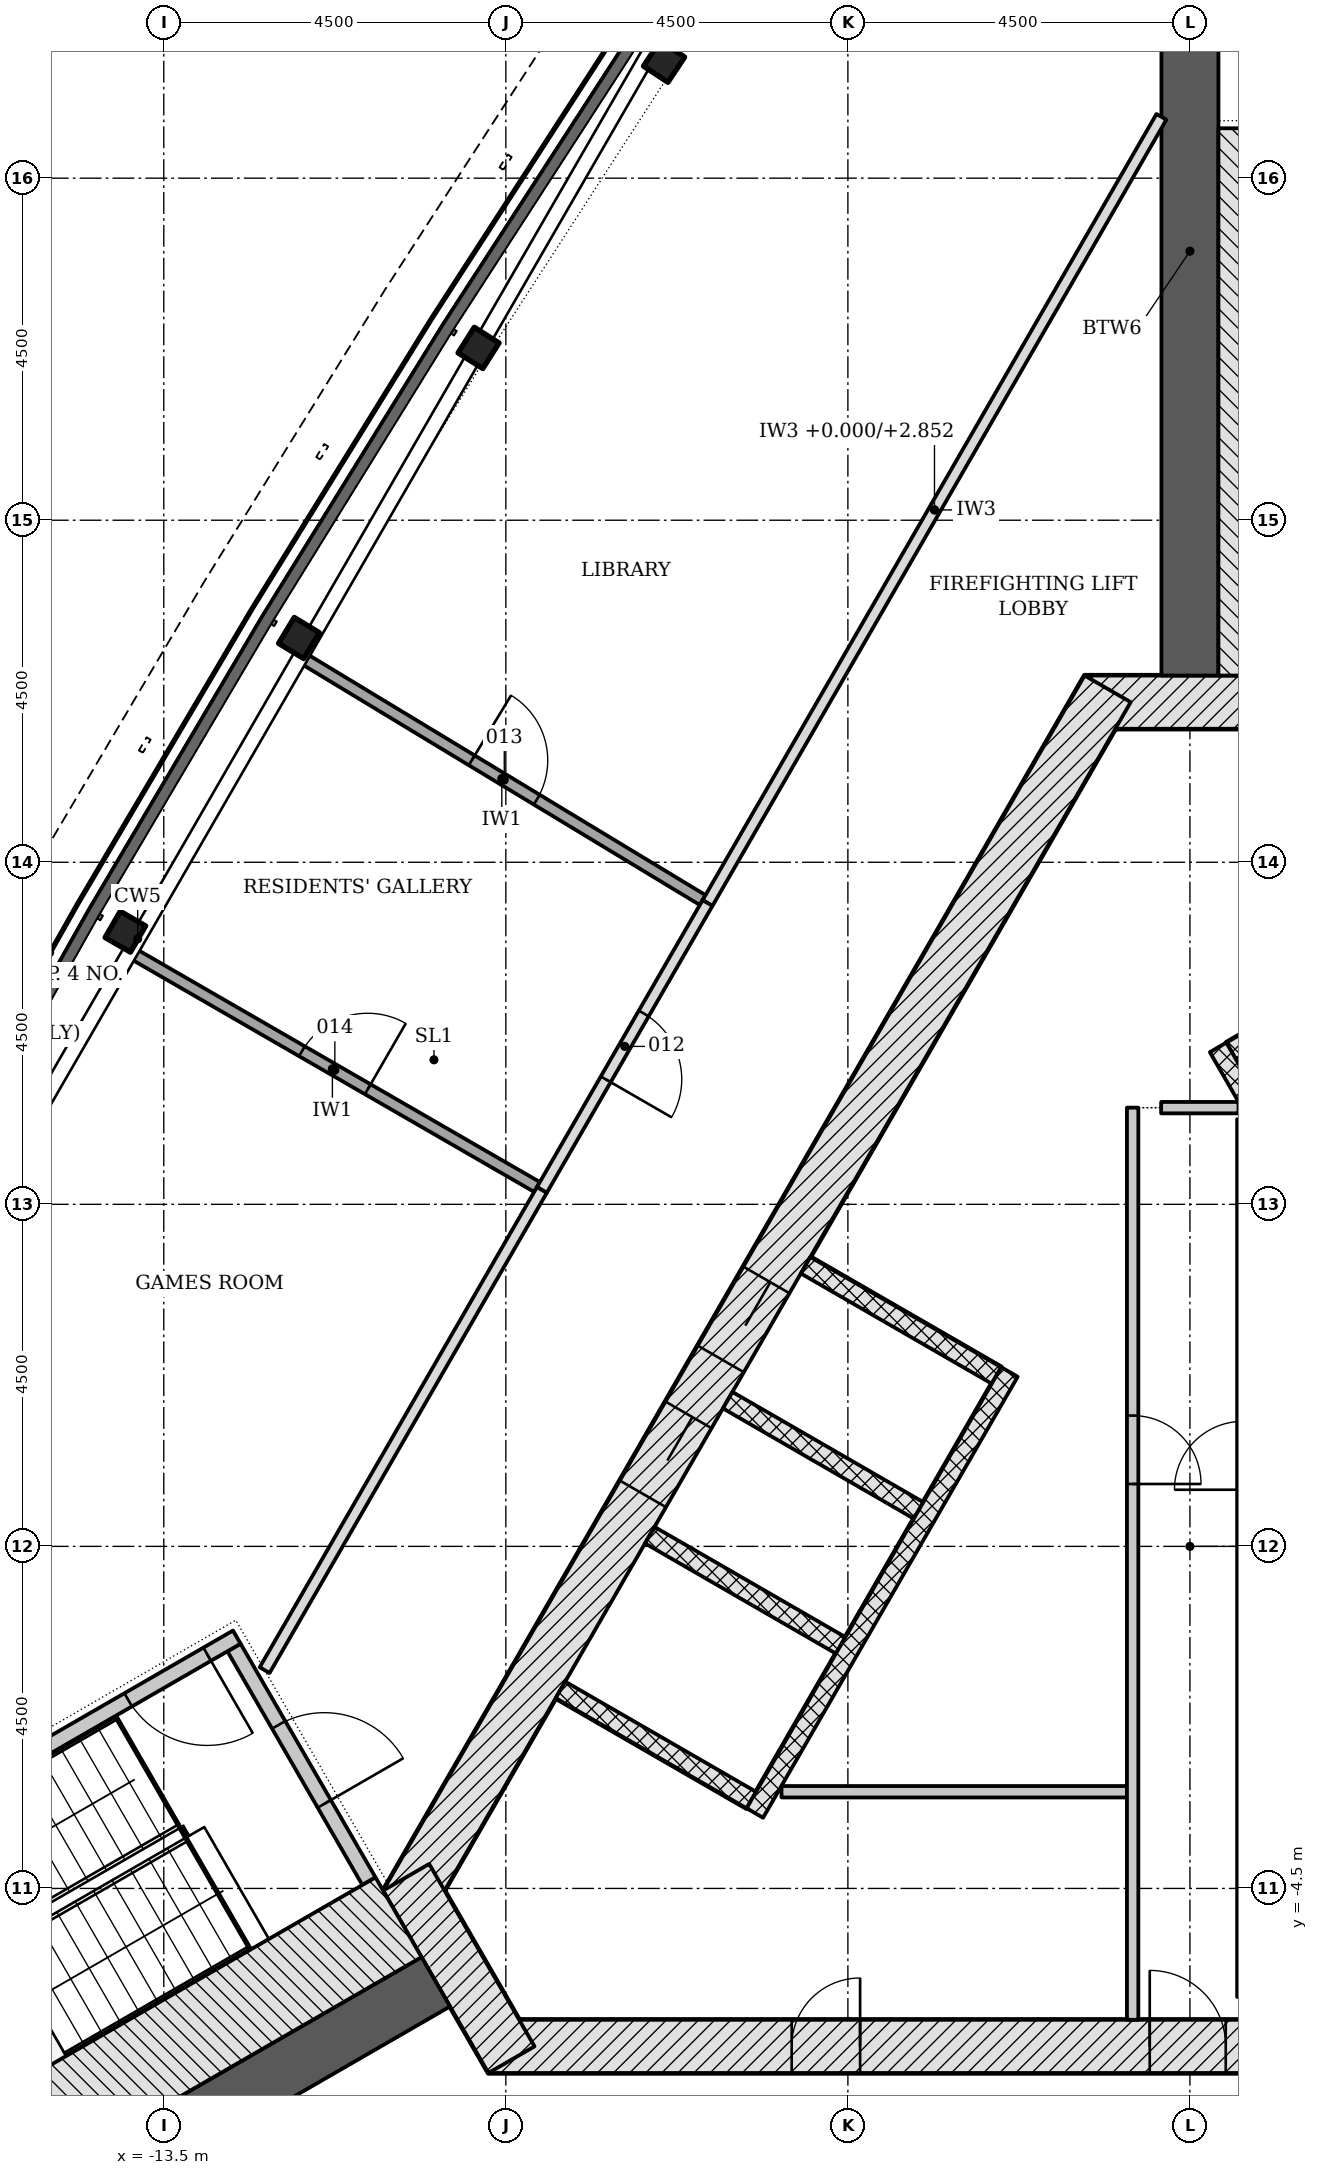
"""IFC4 building model, lengths in metres.
Left out: names, types, materials, properties, quantities, classifications, styles, units other than length and angle.
Written with IfcOpenShell. Run it as: python <this file> out.ifc"""

import sys

from ifc_helpers import new_model, si_unit, direction, frame, frame_2d, origin, origin_2d, place, context, subcontext, project, spatial, rectangle, i_section, extrude, element, fill, save


model = new_model("IFC4")
c1 = context("Model", 3, precision=1e-05, world=origin(), true_north=direction((0.0, 1.0)))
c2 = subcontext(c1, "Body", "Model", "MODEL_VIEW")
j1 = project(units=[si_unit("LENGTHUNIT", "METRE"), si_unit("PLANEANGLEUNIT", "RADIAN")], contexts=[c1])
p1 = place(None, origin())
s1 = spatial("IfcSite", under=j1, at=p1, CompositionType="ELEMENT")
p2 = place(p1, origin())
s2 = spatial("IfcBuilding", under=s1, at=p2, CompositionType="ELEMENT")
p3 = place(p2, frame((0.0, 0.0, 140.1)))
s3 = spatial("IfcBuildingStorey", under=s2, at=p3, CompositionType="ELEMENT", Elevation=140.1)
p4 = place(p3, frame((-9.229, -6.578, -0.2), z_axis=(0.0, 0.0, 1.0), x_axis=(1.0, 0.0, 0.0)))
e1 = element("IfcWall", 1, at=p4, inside=s3, PredefinedType="SHEAR", context=c2, shape_type="SweptSolid", body=[
    extrude(rectangle(XDim=18.458, YDim=0.7, at=frame_2d((9.229, 0.0))), origin(), (0.0, 0.0, 1.0), 3.6),
])
p5 = place(p4, frame((8.7, 0.0, 0.2)))
e2 = element("IfcOpeningElement", 2, at=p5, cuts=e1, PredefinedType="OPENING", context=c2, shape_type="SweptSolid", body=[
    extrude(rectangle(XDim=1.0, YDim=2.1, at=frame_2d((0.5, 1.05))), frame((0.0, 0.36, 0.0), z_axis=(0.0, -1.0, 0.0), x_axis=(1.0, 0.0, 0.0)), (0.0, 0.0, 1.0), 0.72),
])
p6 = place(p4, frame((3.99, 0.0, 0.2)))
e3 = element("IfcOpeningElement", 3, at=p6, cuts=e1, PredefinedType="OPENING", context=c2, shape_type="SweptSolid", body=[
    extrude(rectangle(XDim=0.9, YDim=2.1, at=frame_2d((0.45, 1.05))), frame((0.0, 0.36, 0.0), z_axis=(0.0, -1.0, 0.0), x_axis=(1.0, 0.0, 0.0)), (0.0, 0.0, 1.0), 0.72),
])
p7 = place(p4, frame((13.489, 0.0, 0.2)))
e4 = element("IfcOpeningElement", 4, at=p7, cuts=e1, PredefinedType="OPENING", context=c2, shape_type="SweptSolid", body=[
    extrude(rectangle(XDim=1.0, YDim=2.1, at=frame_2d((0.5, 1.05))), frame((0.0, 0.36, 0.0), z_axis=(0.0, -1.0, 0.0), x_axis=(1.0, 0.0, 0.0)), (0.0, 0.0, 1.0), 0.72),
])
p8 = place(p3, frame((1.386, 11.106, -0.2), z_axis=(0.0, 0.0, 1.0), x_axis=(-1.0, 0.0, 0.0)))
e5 = element("IfcWall", 5, at=p8, inside=s3, PredefinedType="SHEAR", context=c2, shape_type="SweptSolid", body=[
    extrude(rectangle(XDim=2.771, YDim=0.7, at=frame_2d((1.386, 0.0))), origin(), (0.0, 0.0, 1.0), 3.6),
])
p9 = place(p3, frame((-1.083, 11.281, -0.2), z_axis=(0.0, 0.0, 1.0), x_axis=(-0.500001446645, -0.866024568562, 0.0)))
e6 = element("IfcWall", 6, at=p9, inside=s3, PredefinedType="SHEAR", context=c2, shape_type="SweptSolid", body=[
    extrude(rectangle(XDim=18.458, YDim=0.7, at=frame_2d((9.229, 0.0))), origin(), (0.0, 0.0, 1.0), 3.6),
])
p10 = place(p9, frame((8.979, 0.0, 0.2)))
e7 = element("IfcOpeningElement", 7, at=p10, cuts=e6, PredefinedType="OPENING", context=c2, shape_type="SweptSolid", body=[
    extrude(rectangle(XDim=1.2, YDim=2.1, at=frame_2d((0.6, 1.05))), frame((0.0, 0.36, 0.0), z_axis=(0.0, -1.0, 0.0), x_axis=(1.0, 0.0, 0.0)), (0.0, 0.0, 1.0), 0.72),
])
p11 = place(p9, frame((11.029, 0.0, 0.2)))
e8 = element("IfcOpeningElement", 8, at=p11, cuts=e6, PredefinedType="OPENING", context=c2, shape_type="SweptSolid", body=[
    extrude(rectangle(XDim=1.2, YDim=2.1, at=frame_2d((0.6, 1.05))), frame((0.0, 0.36, 0.0), z_axis=(0.0, -1.0, 0.0), x_axis=(1.0, 0.0, 0.0)), (0.0, 0.0, 1.0), 0.72),
])
p12 = place(p3, frame((-10.311, -4.353, -0.2), z_axis=(0.0, 0.0, 1.0), x_axis=(0.500042739161, -0.866000726912, 0.0)))
e9 = element("IfcWall", 9, at=p12, inside=s3, PredefinedType="SHEAR", context=c2, shape_type="SweptSolid", body=[
    extrude(rectangle(XDim=2.771, YDim=0.7, at=frame_2d((1.386, 0.0))), origin(), (0.0, 0.0, 1.0), 3.6),
])
p13 = place(p3, frame((0.0, 11.456, -0.2), z_axis=(0.0, 0.0, 1.0), x_axis=(0.0, 1.0, 0.0)))
e10 = element("IfcWall", 10, at=p13, inside=s3, PredefinedType="SHEAR", context=c2, shape_type="SweptSolid", body=[
    extrude(rectangle(XDim=11.167, YDim=0.75, at=frame_2d((5.583, 0.0))), origin(), (0.0, 0.0, 1.0), 3.6),
])
p14 = place(p3, frame((-9.922, -5.728, -0.2), z_axis=(0.0, 0.0, 1.0), x_axis=(-0.866023928423, -0.500002555393, 0.0)))
e11 = element("IfcWall", 11, at=p14, inside=s3, PredefinedType="SHEAR", context=c2, shape_type="SweptSolid", body=[
    extrude(rectangle(XDim=11.167, YDim=0.75, at=frame_2d((5.583, 0.0))), origin(), (0.0, 0.0, 1.0), 3.6),
])
for number, where, z_axis, x_axis in (
    (12, (-6.918, 19.534, -0.2), (0.0, 0.0, 1.0), (-0.552, -0.834, 0.0)),
    (13, (-9.359, 15.767, -0.2), (0.0, 0.0, 1.0), (-0.535, -0.845, 0.0)),
    (14, (-11.722, 11.95, -0.2), (0.0, 0.0, 1.0), (-0.518, -0.856, 0.0)),
    (15, (-14.006, 8.086, -0.2), (0.0, 0.0, 1.0), (-0.5, -0.866, 0.0)),
):
    element("IfcColumn", number, at=place(p3, frame(where, z_axis=z_axis, x_axis=x_axis)), inside=s3, PredefinedType="COLUMN", context=c2, shape_type="SweptSolid", body=[
        extrude(i_section(OverallWidth=0.399, OverallDepth=0.386, WebThickness=0.021, FlangeThickness=0.033, FilletRadius=0.015, at=origin_2d()), origin(), (0.0, 0.0, 1.0), 3.6),
    ])
p15 = place(p3, frame((2.706, 7.769, -0.2), z_axis=(0.0, 0.0, 1.0), x_axis=(-0.866022959057, -0.500004234368, 0.0)))
e16 = element("IfcWall", 16, at=p15, inside=s3, PredefinedType="PARTITIONING", context=c2, shape_type="SweptSolid", body=[
    extrude(rectangle(XDim=2.5, YDim=0.25, at=frame_2d((1.25, 0.0))), origin(), (0.0, 0.0, 1.0), 3.6),
])
p16 = place(p3, frame((5.87, -2.961, 0.0), z_axis=(0.0, 0.0, 1.0), x_axis=(-0.50000615651, 0.866021849293, 0.0)))
e17 = element("IfcWall", 17, at=p16, inside=s3, PredefinedType="PARTITIONING", context=c2, shape_type="SweptSolid", body=[
    extrude(rectangle(XDim=11.0, YDim=0.25, at=frame_2d((5.5, 0.0))), origin(), (0.0, 0.0, 1.0), 3.4),
])
for number, where, z_axis, x_axis in (
    (18, (-5.056, 3.699, -0.2), (0.0, 0.0, 1.0), (0.866, -0.5, 0.0)),
    (19, (-6.081, 1.923, -0.2), (0.0, 0.0, 1.0), (0.866, -0.5, 0.0)),
    (20, (-7.106, 0.148, -0.2), (0.0, 0.0, 1.0), (0.866, -0.5, 0.0)),
    (21, (-8.281, -1.887, -0.2), (0.0, 0.0, 1.0), (0.866, -0.5, 0.0)),
):
    element("IfcWall", number, at=place(p3, frame(where, z_axis=z_axis, x_axis=x_axis)), inside=s3, PredefinedType="PARTITIONING", context=c2, shape_type="SweptSolid", body=[
        extrude(rectangle(XDim=2.9, YDim=0.25, at=frame_2d((1.45, 0.0))), origin(), (0.0, 0.0, 1.0), 3.6),
    ])
p17 = place(p3, frame((-2.374, 2.294, 0.0), z_axis=(0.0, 0.0, 1.0), x_axis=(-0.500003174267, -0.866023571113, 0.0)))
e22 = element("IfcWall", 22, at=p17, inside=s3, PredefinedType="PARTITIONING", context=c2, shape_type="SweptSolid", body=[
    extrude(rectangle(XDim=6.7, YDim=0.25, at=frame_2d((3.35, 0.0))), origin(), (0.0, 0.0, 1.0), 3.4),
])
p18 = place(p3, frame((-5.373, -3.228, 0.0), z_axis=(0.0, 0.0, 1.0), x_axis=(1.0, 0.0, 0.0)))
e23 = element("IfcWall", 23, at=p18, inside=s3, PredefinedType="PARTITIONING", context=c2, shape_type="SweptSolid", body=[
    extrude(rectangle(XDim=4.545, YDim=0.15, at=frame_2d((2.272, 0.0))), origin(), (0.0, 0.0, 1.0), 3.4),
])
p19 = place(p3, frame((-0.754, 5.772, 0.0), z_axis=(0.0, 0.0, 1.0), x_axis=(0.0, -1.0, 0.0)))
e24 = element("IfcWall", 24, at=p19, inside=s3, PredefinedType="PARTITIONING", context=c2, shape_type="SweptSolid", body=[
    extrude(rectangle(XDim=12.0, YDim=0.15, at=frame_2d((6.0, 0.0))), origin(), (0.0, 0.0, 1.0), 3.4),
])
p20 = place(p19, frame((4.051, 0.0, 0.0)))
e25 = element("IfcOpeningElement", 25, at=p20, cuts=e24, PredefinedType="OPENING", context=c2, shape_type="SweptSolid", body=[
    extrude(rectangle(XDim=0.9, YDim=2.1, at=frame_2d((0.45, 1.05))), frame((0.0, 0.085, 0.0), z_axis=(0.0, -1.0, 0.0), x_axis=(1.0, 0.0, 0.0)), (0.0, 0.0, 1.0), 0.17),
])
p21 = place(p3, frame((-0.379, 5.772, 0.0), z_axis=(0.0, 0.0, 1.0), x_axis=(1.0, 0.0, 0.0)))
e26 = element("IfcWall", 26, at=p21, inside=s3, PredefinedType="PARTITIONING", context=c2, shape_type="SweptSolid", body=[
    extrude(rectangle(XDim=1.018, YDim=0.15, at=frame_2d((0.509, 0.0))), origin(), (0.0, 0.0, 1.0), 3.4),
])
p22 = place(p3, frame((0.696, -5.928, 0.0), z_axis=(0.0, 0.0, 1.0), x_axis=(0.0, 1.0, 0.0)))
e27 = element("IfcWall", 27, at=p22, inside=s3, PredefinedType="PARTITIONING", context=c2, shape_type="SweptSolid", body=[
    extrude(rectangle(XDim=11.549, YDim=0.15, at=frame_2d((5.774, 0.0))), origin(), (0.0, 0.0, 1.0), 3.4),
])
p23 = place(p22, frame((6.673, 0.0, 0.0)))
e28 = element("IfcOpeningElement", 28, at=p23, cuts=e27, PredefinedType="OPENING", context=c2, shape_type="SweptSolid", body=[
    extrude(rectangle(XDim=0.9, YDim=2.1, at=frame_2d((0.45, 1.05))), frame((0.0, 0.085, 0.0), z_axis=(0.0, -1.0, 0.0), x_axis=(1.0, 0.0, 0.0)), (0.0, 0.0, 1.0), 0.17),
])
p24 = place(p3, frame((0.98, 11.456, -0.2), z_axis=(0.0, 0.0, 1.0), x_axis=(0.0, 1.0, 0.0)))
e29 = element("IfcWall", 29, at=p24, inside=s3, PredefinedType="SHEAR", context=c2, shape_type="SweptSolid", body=[
    extrude(rectangle(XDim=7.2, YDim=1.211, at=frame_2d((3.6, 0.0))), origin(), (0.0, 0.0, 1.0), 3.6),
])
p25 = place(p3, frame((-12.576, -1.331, -0.2), z_axis=(0.0, 0.0, 1.0), x_axis=(0.499970499736, -0.8660424351, 0.0)))
e30 = element("IfcWall", 30, at=p25, inside=s3, PredefinedType="SHEAR", context=c2, shape_type="SweptSolid", body=[
    extrude(rectangle(XDim=3.55, YDim=0.2, at=frame_2d((1.775, 0.0))), origin(), (0.0, 0.0, 1.0), 3.6),
])
p26 = place(p25, frame((1.175, 0.0, 0.2)))
e31 = element("IfcOpeningElement", 31, at=p26, cuts=e30, PredefinedType="OPENING", context=c2, shape_type="SweptSolid", body=[
    extrude(rectangle(XDim=1.2, YDim=2.1, at=frame_2d((0.6, 1.05))), frame((0.0, 0.11, 0.0), z_axis=(0.0, -1.0, 0.0), x_axis=(1.0, 0.0, 0.0)), (0.0, 0.0, 1.0), 0.22),
])
p27 = place(p3, frame((-12.539, -1.194, -0.2), z_axis=(0.0, 0.0, 1.0), x_axis=(-0.866045472092, -0.499965239061, 0.0)))
e32 = element("IfcWall", 32, at=p27, inside=s3, PredefinedType="SHEAR", context=c2, shape_type="SweptSolid", body=[
    extrude(rectangle(XDim=5.6, YDim=0.2, at=frame_2d((2.8, 0.0))), origin(), (0.0, 0.0, 1.0), 3.6),
])
p28 = place(p27, frame((0.45, 0.0, 0.2)))
e33 = element("IfcOpeningElement", 33, at=p28, cuts=e32, PredefinedType="OPENING", context=c2, shape_type="SweptSolid", body=[
    extrude(rectangle(XDim=1.2, YDim=2.1, at=frame_2d((0.6, 1.05))), frame((0.0, 0.11, 0.0), z_axis=(0.0, -1.0, 0.0), x_axis=(1.0, 0.0, 0.0)), (0.0, 0.0, 1.0), 0.22),
])
p29 = place(p3, frame((-10.412, -4.879, -0.2), z_axis=(0.0, 0.0, 1.0), x_axis=(-0.866026919366, -0.499997374926, 0.0)))
e34 = element("IfcWall", 34, at=p29, inside=s3, PredefinedType="SHEAR", context=c2, shape_type="SweptSolid", body=[
    extrude(rectangle(XDim=7.2, YDim=1.211, at=frame_2d((3.6, 0.0))), origin(), (0.0, 0.0, 1.0), 3.6),
])
p30 = place(p3, frame((-0.375, 18.807, 0.0), z_axis=(0.0, 0.0, 1.0), x_axis=(-0.499995562011, -0.866027966043, 0.0)))
e35 = element("IfcWall", 35, at=p30, inside=s3, PredefinedType="PARTITIONING", context=c2, shape_type="SweptSolid", body=[
    extrude(rectangle(XDim=11.942, YDim=0.15, at=frame_2d((5.971, 0.0))), origin(), (0.0, 0.0, 1.0), 2.852),
])
p31 = place(p3, frame((-8.525, 4.691, 0.0), z_axis=(0.0, 0.0, 1.0), x_axis=(-0.499986021771, -0.866033473968, 0.0)))
e36 = element("IfcWall", 36, at=p31, inside=s3, PredefinedType="PARTITIONING", context=c2, shape_type="SweptSolid", body=[
    extrude(rectangle(XDim=7.297, YDim=0.15, at=frame_2d((3.648, 0.0))), origin(), (0.0, 0.0, 1.0), 2.847),
])
p32 = place(p3, frame((-11.695, 11.7, 0.0), z_axis=(0.0, 0.0, 1.0), x_axis=(0.855596827578, -0.517642800238, 0.0)))
e37 = element("IfcWall", 37, at=p32, inside=s3, PredefinedType="PARTITIONING", context=c2, shape_type="SweptSolid", body=[
    extrude(rectangle(XDim=6.177, YDim=0.15, at=frame_2d((3.088, 0.0))), origin(), (0.0, 0.0, 1.0), 3.4),
])
p33 = place(p32, frame((2.626, 0.0, 0.0)))
e38 = element("IfcOpeningElement", 38, at=p33, cuts=e37, PredefinedType="OPENING", context=c2, shape_type="SweptSolid", body=[
    extrude(rectangle(XDim=1.0, YDim=2.1, at=frame_2d((0.5, 1.05))), frame((0.0, 0.085, 0.0), z_axis=(0.0, -1.0, 0.0), x_axis=(1.0, 0.0, 0.0)), (0.0, 0.0, 1.0), 0.17),
])
p34 = place(p3, frame((-13.974, 7.837, 0.0), z_axis=(0.0, 0.0, 1.0), x_axis=(0.866040415161, -0.499973998632, 0.0)))
e39 = element("IfcWall", 39, at=p34, inside=s3, PredefinedType="PARTITIONING", context=c2, shape_type="SweptSolid", body=[
    extrude(rectangle(XDim=6.217, YDim=0.15, at=frame_2d((3.108, 0.0))), origin(), (0.0, 0.0, 1.0), 3.4),
])
p35 = place(p34, frame((2.646, 0.0, 0.0)))
e40 = element("IfcOpeningElement", 40, at=p35, cuts=e39, PredefinedType="OPENING", context=c2, shape_type="SweptSolid", body=[
    extrude(rectangle(XDim=1.0, YDim=2.1, at=frame_2d((0.5, 1.05))), frame((0.0, 0.085, 0.0), z_axis=(0.0, -1.0, 0.0), x_axis=(1.0, 0.0, 0.0)), (0.0, 0.0, 1.0), 0.17),
])
p36 = place(p3, frame((-6.346, 8.464, 0.0), z_axis=(0.0, 0.0, 1.0), x_axis=(-0.50001992892, -0.866013897511, 0.0)))
e41 = element("IfcWall", 41, at=p36, inside=s3, PredefinedType="PARTITIONING", context=c2, shape_type="SweptSolid", body=[
    extrude(rectangle(XDim=4.357, YDim=0.15, at=frame_2d((2.179, 0.0))), origin(), (0.0, 0.0, 1.0), 2.847),
])
p37 = place(p36, frame((1.678, 0.0, 0.0)))
e42 = element("IfcOpeningElement", 42, at=p37, cuts=e41, PredefinedType="OPENING", context=c2, shape_type="SweptSolid", body=[
    extrude(rectangle(XDim=1.0, YDim=2.1, at=frame_2d((0.5, 1.05))), frame((0.0, 0.085, 0.0), z_axis=(0.0, -1.0, 0.0), x_axis=(1.0, 0.0, 0.0)), (0.0, 0.0, 1.0), 0.17),
])
p38 = place(p10, origin())
e43 = element("IfcDoor", 43, at=p38, inside=s3, OperationType="DOUBLE_DOOR_SLIDING", PredefinedType="DOOR", context=c2, shape_type="SweptSolid", body=[
    extrude(rectangle(XDim=1.2, YDim=2.1, at=frame_2d((0.6, 1.05))), frame((0.0, 0.025, 0.0), z_axis=(0.0, -1.0, 0.0), x_axis=(1.0, 0.0, 0.0)), (0.0, 0.0, 1.0), 0.05),
])
fill(e7, e43)
p39 = place(p11, origin())
e44 = element("IfcDoor", 44, at=p39, inside=s3, OperationType="DOUBLE_DOOR_SLIDING", PredefinedType="DOOR", context=c2, shape_type="SweptSolid", body=[
    extrude(rectangle(XDim=1.2, YDim=2.1, at=frame_2d((0.6, 1.05))), frame((0.0, 0.025, 0.0), z_axis=(0.0, -1.0, 0.0), x_axis=(1.0, 0.0, 0.0)), (0.0, 0.0, 1.0), 0.05),
])
fill(e8, e44)
p40 = place(p5, origin())
e45 = element("IfcDoor", 45, at=p40, inside=s3, OperationType="SINGLE_SWING_LEFT", PredefinedType="DOOR", context=c2, shape_type="SweptSolid", body=[
    extrude(rectangle(XDim=1.0, YDim=2.1, at=frame_2d((0.5, 1.05))), frame((0.0, 0.075, 0.0), z_axis=(0.0, -1.0, 0.0), x_axis=(1.0, 0.0, 0.0)), (0.0, 0.0, 1.0), 0.15),
])
fill(e2, e45)
p41 = place(p6, origin())
e46 = element("IfcDoor", 46, at=p41, inside=s3, OperationType="SINGLE_SWING_RIGHT", PredefinedType="DOOR", context=c2, shape_type="SweptSolid", body=[
    extrude(rectangle(XDim=0.9, YDim=2.1, at=frame_2d((0.45, 1.05))), frame((0.0, 0.075, 0.0), z_axis=(0.0, -1.0, 0.0), x_axis=(1.0, 0.0, 0.0)), (0.0, 0.0, 1.0), 0.15),
])
fill(e3, e46)
p42 = place(p20, origin())
e47 = element("IfcDoor", 47, at=p42, inside=s3, OperationType="SINGLE_SWING_RIGHT", PredefinedType="DOOR", context=c2, shape_type="SweptSolid", body=[
    extrude(rectangle(XDim=0.9, YDim=2.1, at=frame_2d((0.45, 1.05))), frame((0.0, 0.025, 0.0), z_axis=(0.0, -1.0, 0.0), x_axis=(1.0, 0.0, 0.0)), (0.0, 0.0, 1.0), 0.05),
])
fill(e25, e47)
p43 = place(p26, origin())
e48 = element("IfcDoor", 48, at=p43, inside=s3, OperationType="SINGLE_SWING_RIGHT", PredefinedType="DOOR", context=c2, shape_type="SweptSolid", body=[
    extrude(rectangle(XDim=1.2, YDim=2.1, at=frame_2d((0.6, 1.05))), frame((0.0, 0.025, 0.0), z_axis=(0.0, -1.0, 0.0), x_axis=(1.0, 0.0, 0.0)), (0.0, 0.0, 1.0), 0.05),
])
fill(e31, e48)
p44 = place(p28, origin())
e49 = element("IfcDoor", 49, at=p44, inside=s3, OperationType="SINGLE_SWING_LEFT", PredefinedType="DOOR", context=c2, shape_type="SweptSolid", body=[
    extrude(rectangle(XDim=1.2, YDim=2.1, at=frame_2d((0.6, 1.05))), frame((0.0, 0.025, 0.0), z_axis=(0.0, -1.0, 0.0), x_axis=(1.0, 0.0, 0.0)), (0.0, 0.0, 1.0), 0.05),
])
fill(e33, e49)
p45 = place(p37, origin())
e50 = element("IfcDoor", 50, at=p45, inside=s3, OperationType="SINGLE_SWING_RIGHT", PredefinedType="DOOR", context=c2, shape_type="SweptSolid", body=[
    extrude(rectangle(XDim=1.0, YDim=2.1, at=frame_2d((0.5, 1.05))), frame((0.0, 0.025, 0.0), z_axis=(0.0, -1.0, 0.0), x_axis=(1.0, 0.0, 0.0)), (0.0, 0.0, 1.0), 0.05),
])
fill(e42, e50)
p46 = place(p33, origin())
e51 = element("IfcDoor", 51, at=p46, inside=s3, OperationType="SINGLE_SWING_LEFT", PredefinedType="DOOR", context=c2, shape_type="SweptSolid", body=[
    extrude(rectangle(XDim=1.0, YDim=2.1, at=frame_2d((0.5, 1.05))), frame((0.0, 0.025, 0.0), z_axis=(0.0, -1.0, 0.0), x_axis=(1.0, 0.0, 0.0)), (0.0, 0.0, 1.0), 0.05),
])
fill(e38, e51)
p47 = place(p35, origin())
e52 = element("IfcDoor", 52, at=p47, inside=s3, OperationType="SINGLE_SWING_RIGHT", PredefinedType="DOOR", context=c2, shape_type="SweptSolid", body=[
    extrude(rectangle(XDim=1.0, YDim=2.1, at=frame_2d((0.5, 1.05))), frame((0.0, 0.025, 0.0), z_axis=(0.0, -1.0, 0.0), x_axis=(1.0, 0.0, 0.0)), (0.0, 0.0, 1.0), 0.05),
])
fill(e40, e52)
save(model, sys.argv[1])
